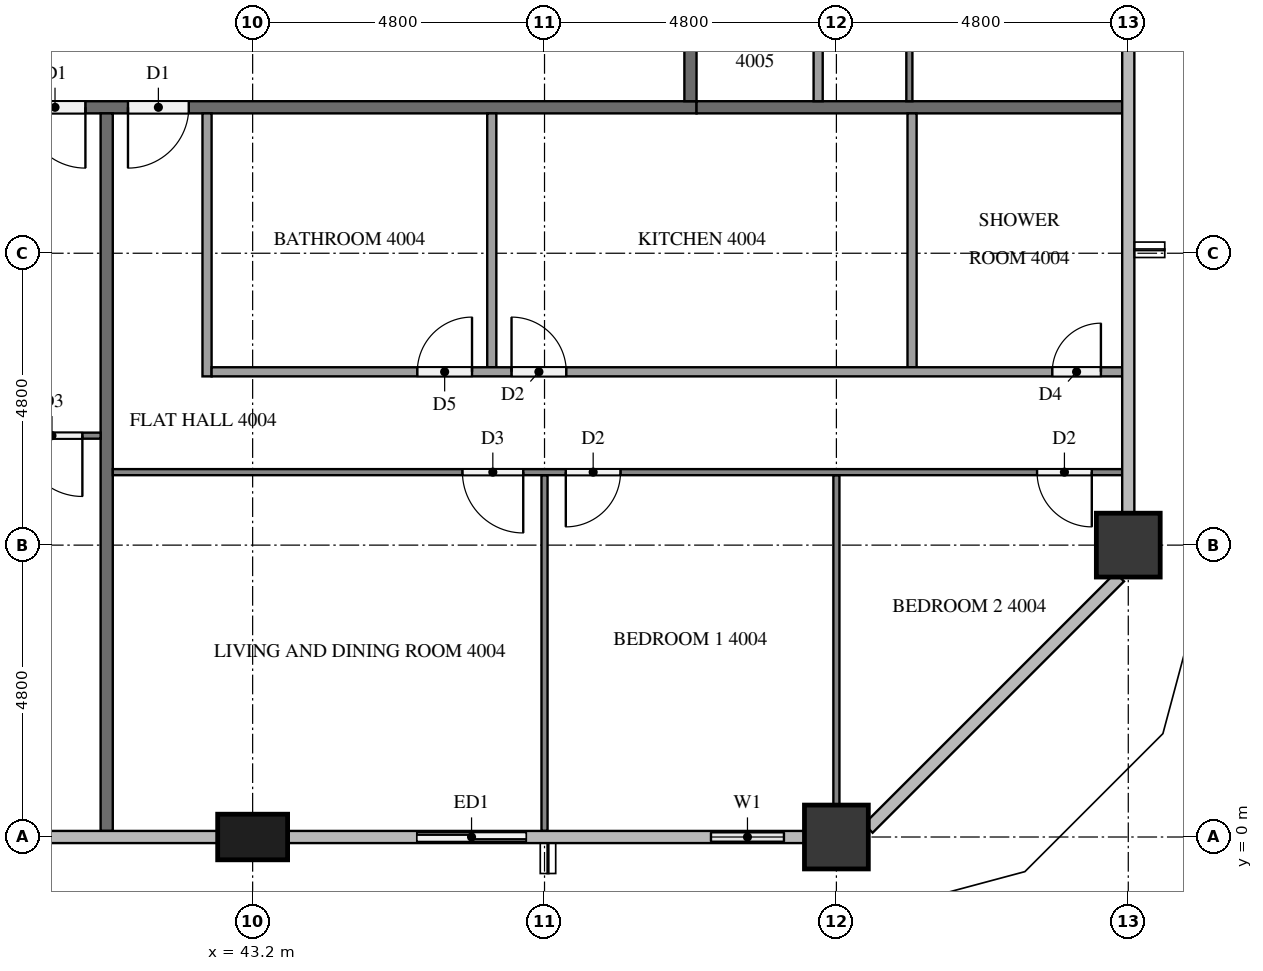
"""IFC4 building model, lengths in metres.
Left out: names, types, materials, properties, quantities, classifications, styles, units other than length and angle.
Written with IfcOpenShell. Run it as: python <this file> out.ifc"""

import sys

from ifc_helpers import new_model, si_unit, direction, frame, frame_2d, origin, origin_2d, place, context, subcontext, project, spatial, rectangle, extrude, element, fill, save


model = new_model("IFC4")
c1 = context("Model", 3, precision=1e-05, world=origin(), true_north=direction((0.0, 1.0)))
c2 = subcontext(c1, "Body", "Model", "MODEL_VIEW")
j1 = project(units=[si_unit("LENGTHUNIT", "METRE"), si_unit("PLANEANGLEUNIT", "RADIAN")], contexts=[c1])
p1 = place(None, origin())
s1 = spatial("IfcSite", under=j1, at=p1, CompositionType="ELEMENT")
p2 = place(p1, origin())
s2 = spatial("IfcBuilding", under=s1, at=p2, CompositionType="ELEMENT")
p3 = place(p2, frame((0.0, 0.0, 156.0)))
s3 = spatial("IfcBuildingStorey", under=s2, at=p3, CompositionType="ELEMENT", Elevation=156.0)
p4 = place(p3, frame((43.2, 0.0, 0.0), z_axis=(0.0, 0.0, 1.0), x_axis=(1.0, 0.0, 0.0)))
e1 = element("IfcColumn", 1, at=p4, inside=s3, PredefinedType="COLUMN", context=c2, shape_type="SweptSolid", body=[
    extrude(rectangle(XDim=1.15, YDim=0.75, at=origin_2d()), origin(), (0.0, 0.0, 1.0), 3.2),
])
for number, where, z_axis, x_axis in (
    (2, (52.8, 0.0, 0.0), (0.0, 0.0, 1.0), (1.0, 0.0, 0.0)),
    (3, (57.6, 4.8, 0.0), (0.0, 0.0, 1.0), (1.0, 0.0, 0.0)),
):
    element("IfcColumn", number, at=place(p3, frame(where, z_axis=z_axis, x_axis=x_axis)), inside=s3, PredefinedType="COLUMN", context=c2, shape_type="SweptSolid", body=[
        extrude(rectangle(XDim=1.05, YDim=1.05, at=origin_2d()), origin(), (0.0, 0.0, 1.0), 3.2),
    ])
p5 = place(p3, frame((45.6, 0.0, 0.0), z_axis=(0.0, 0.0, 1.0), x_axis=(1.0, 0.0, 0.0)))
e4 = element("IfcWall", 4, at=p5, inside=s3, PredefinedType="SOLIDWALL", context=c2, shape_type="SweptSolid", body=[
    extrude(rectangle(XDim=2.4, YDim=0.15, at=frame_2d((1.2, 0.0))), origin(), (0.0, 0.0, 1.0), 3.2),
])
p6 = place(p5, frame((0.3, 0.0, 0.0)))
e5 = element("IfcOpeningElement", 5, at=p6, cuts=e4, PredefinedType="OPENING", context=c2, shape_type="SweptSolid", body=[
    extrude(rectangle(XDim=1.8, YDim=2.4, at=frame_2d((0.9, 1.2))), frame((0.0, 0.085, 0.0), z_axis=(0.0, -1.0, 0.0), x_axis=(1.0, 0.0, 0.0)), (0.0, 0.0, 1.0), 0.17),
])
p7 = place(p3, frame((50.4, 0.0, 0.0), z_axis=(0.0, 0.0, 1.0), x_axis=(1.0, 0.0, 0.0)))
e6 = element("IfcWall", 6, at=p7, inside=s3, PredefinedType="SOLIDWALL", context=c2, shape_type="SweptSolid", body=[
    extrude(rectangle(XDim=1.875, YDim=0.15, at=frame_2d((0.938, 0.0))), origin(), (0.0, 0.0, 1.0), 3.2),
])
p8 = place(p7, frame((0.337, 0.0, 0.9)))
e7 = element("IfcOpeningElement", 7, at=p8, cuts=e6, PredefinedType="OPENING", context=c2, shape_type="SweptSolid", body=[
    extrude(rectangle(XDim=1.2, YDim=1.4, at=frame_2d((0.6, 0.7))), frame((0.0, 0.085, 0.0), z_axis=(0.0, -1.0, 0.0), x_axis=(1.0, 0.0, 0.0)), (0.0, 0.0, 1.0), 0.17),
])
p9 = place(p3, frame((50.5, 12.0, 0.0), z_axis=(0.0, 0.0, 1.0), x_axis=(-1.0, 0.0, 0.0)))
e8 = element("IfcWall", 8, at=p9, inside=s3, PredefinedType="PARTITIONING", context=c2, shape_type="SweptSolid", body=[
    extrude(rectangle(XDim=38.6, YDim=0.2, at=frame_2d((19.3, 0.0))), origin(), (0.0, 0.0, 1.0), 3.2),
])
p10 = place(p9, frame((36.45, 0.0, 0.0)))
e9 = element("IfcOpeningElement", 9, at=p10, cuts=e8, PredefinedType="OPENING", context=c2, shape_type="SweptSolid", body=[
    extrude(rectangle(XDim=1.0, YDim=2.1, at=frame_2d((0.5, 1.05))), frame((0.0, 0.11, 0.0), z_axis=(0.0, -1.0, 0.0), x_axis=(1.0, 0.0, 0.0)), (0.0, 0.0, 1.0), 0.22),
])
p11 = place(p9, frame((34.75, 0.0, 0.0)))
e10 = element("IfcOpeningElement", 10, at=p11, cuts=e8, PredefinedType="OPENING", context=c2, shape_type="SweptSolid", body=[
    extrude(rectangle(XDim=1.0, YDim=2.1, at=frame_2d((0.5, 1.05))), frame((0.0, 0.11, 0.0), z_axis=(0.0, -1.0, 0.0), x_axis=(1.0, 0.0, 0.0)), (0.0, 0.0, 1.0), 0.22),
])
p12 = place(p9, frame((10.05, 0.0, 0.0)))
e11 = element("IfcOpeningElement", 11, at=p12, cuts=e8, PredefinedType="OPENING", context=c2, shape_type="SweptSolid", body=[
    extrude(rectangle(XDim=1.0, YDim=2.1, at=frame_2d((0.5, 1.05))), frame((0.0, 0.11, 0.0), z_axis=(0.0, -1.0, 0.0), x_axis=(1.0, 0.0, 0.0)), (0.0, 0.0, 1.0), 0.22),
])
p13 = place(p9, frame((8.35, 0.0, 0.0)))
e12 = element("IfcOpeningElement", 12, at=p13, cuts=e8, PredefinedType="OPENING", context=c2, shape_type="SweptSolid", body=[
    extrude(rectangle(XDim=1.0, YDim=2.1, at=frame_2d((0.5, 1.05))), frame((0.0, 0.11, 0.0), z_axis=(0.0, -1.0, 0.0), x_axis=(1.0, 0.0, 0.0)), (0.0, 0.0, 1.0), 0.22),
])
p14 = place(p3, frame((50.4, 40.7, 0.0), z_axis=(0.0, 0.0, 1.0), x_axis=(0.0, -1.0, 0.0)))
e13 = element("IfcWall", 13, at=p14, inside=s3, PredefinedType="PARTITIONING", context=c2, shape_type="SweptSolid", body=[
    extrude(rectangle(XDim=28.6, YDim=0.2, at=frame_2d((14.3, 0.0))), origin(), (0.0, 0.0, 1.0), 3.2),
])
p15 = place(p14, frame((17.05, 0.0, 0.0)))
e14 = element("IfcOpeningElement", 14, at=p15, cuts=e13, PredefinedType="OPENING", context=c2, shape_type="SweptSolid", body=[
    extrude(rectangle(XDim=1.0, YDim=2.1, at=frame_2d((0.5, 1.05))), frame((0.0, 0.11, 0.0), z_axis=(0.0, -1.0, 0.0), x_axis=(1.0, 0.0, 0.0)), (0.0, 0.0, 1.0), 0.22),
])
p16 = place(p14, frame((15.35, 0.0, 0.0)))
e15 = element("IfcOpeningElement", 15, at=p16, cuts=e13, PredefinedType="OPENING", context=c2, shape_type="SweptSolid", body=[
    extrude(rectangle(XDim=1.0, YDim=2.1, at=frame_2d((0.5, 1.05))), frame((0.0, 0.11, 0.0), z_axis=(0.0, -1.0, 0.0), x_axis=(1.0, 0.0, 0.0)), (0.0, 0.0, 1.0), 0.22),
])
p17 = place(p14, frame((5.75, 0.0, 0.0)))
e16 = element("IfcOpeningElement", 16, at=p17, cuts=e13, PredefinedType="OPENING", context=c2, shape_type="SweptSolid", body=[
    extrude(rectangle(XDim=1.0, YDim=2.1, at=frame_2d((0.5, 1.05))), frame((0.0, 0.11, 0.0), z_axis=(0.0, -1.0, 0.0), x_axis=(1.0, 0.0, 0.0)), (0.0, 0.0, 1.0), 0.22),
])
p18 = place(p3, frame((40.8, 11.9, 0.0), z_axis=(0.0, 0.0, 1.0), x_axis=(0.0, -1.0, 0.0)))
e17 = element("IfcWall", 17, at=p18, inside=s3, PredefinedType="PARTITIONING", context=c2, shape_type="SweptSolid", body=[
    extrude(rectangle(XDim=11.8, YDim=0.2, at=frame_2d((5.9, 0.0))), origin(), (0.0, 0.0, 1.0), 3.2),
])
p19 = place(p3, frame((50.5, 12.0, 0.0), z_axis=(0.0, 0.0, 1.0), x_axis=(1.0, 0.0, 0.0)))
e18 = element("IfcWall", 18, at=p19, inside=s3, PredefinedType="PARTITIONING", context=c2, shape_type="SweptSolid", body=[
    extrude(rectangle(XDim=7.0, YDim=0.2, at=frame_2d((3.5, 0.0))), origin(), (0.0, 0.0, 1.0), 3.2),
])
p20 = place(p3, frame((40.7, 6.6, 0.0), z_axis=(0.0, 0.0, 1.0), x_axis=(-1.0, 0.0, 0.0)))
e19 = element("IfcWall", 19, at=p20, inside=s3, PredefinedType="PARTITIONING", context=c2, shape_type="SweptSolid", body=[
    extrude(rectangle(XDim=14.2, YDim=0.1, at=frame_2d((7.1, 0.0))), origin(), (0.0, 0.0, 1.0), 3.2),
])
p21 = place(p20, frame((0.3, 0.0, 0.0)))
e20 = element("IfcOpeningElement", 20, at=p21, cuts=e19, PredefinedType="OPENING", context=c2, shape_type="SweptSolid", body=[
    extrude(rectangle(XDim=1.0, YDim=2.1, at=frame_2d((0.5, 1.05))), frame((0.0, 0.06, 0.0), z_axis=(0.0, -1.0, 0.0), x_axis=(1.0, 0.0, 0.0)), (0.0, 0.0, 1.0), 0.12),
])
p22 = place(p20, frame((8.25, 0.0, 0.0)))
e21 = element("IfcOpeningElement", 21, at=p22, cuts=e19, PredefinedType="OPENING", context=c2, shape_type="SweptSolid", body=[
    extrude(rectangle(XDim=0.9, YDim=2.1, at=frame_2d((0.45, 1.05))), frame((0.0, 0.06, 0.0), z_axis=(0.0, -1.0, 0.0), x_axis=(1.0, 0.0, 0.0)), (0.0, 0.0, 1.0), 0.12),
])
p23 = place(p20, frame((9.85, 0.0, 0.0)))
e22 = element("IfcOpeningElement", 22, at=p23, cuts=e19, PredefinedType="OPENING", context=c2, shape_type="SweptSolid", body=[
    extrude(rectangle(XDim=0.9, YDim=2.1, at=frame_2d((0.45, 1.05))), frame((0.0, 0.06, 0.0), z_axis=(0.0, -1.0, 0.0), x_axis=(1.0, 0.0, 0.0)), (0.0, 0.0, 1.0), 0.12),
])
p24 = place(p3, frame((48.0, 5.95, 0.0), z_axis=(0.0, 0.0, 1.0), x_axis=(0.0, -1.0, 0.0)))
e23 = element("IfcWall", 23, at=p24, inside=s3, PredefinedType="PARTITIONING", context=c2, shape_type="SweptSolid", body=[
    extrude(rectangle(XDim=5.85, YDim=0.1, at=frame_2d((2.925, 0.0))), origin(), (0.0, 0.0, 1.0), 3.2),
])
p25 = place(p3, frame((52.8, 5.95, 0.0), z_axis=(0.0, 0.0, 1.0), x_axis=(0.0, -1.0, 0.0)))
e24 = element("IfcWall", 24, at=p25, inside=s3, PredefinedType="PARTITIONING", context=c2, shape_type="SweptSolid", body=[
    extrude(rectangle(XDim=5.425, YDim=0.1, at=frame_2d((2.712, 0.0))), origin(), (0.0, 0.0, 1.0), 3.2),
])
p26 = place(p3, frame((57.5, 6.0, 0.0), z_axis=(0.0, 0.0, 1.0), x_axis=(-1.0, 0.0, 0.0)))
e25 = element("IfcWall", 25, at=p26, inside=s3, PredefinedType="PARTITIONING", context=c2, shape_type="SweptSolid", body=[
    extrude(rectangle(XDim=16.6, YDim=0.1, at=frame_2d((8.3, 0.0))), origin(), (0.0, 0.0, 1.0), 3.2),
])
p27 = place(p26, frame((9.85, 0.0, 0.0)))
e26 = element("IfcOpeningElement", 26, at=p27, cuts=e25, PredefinedType="OPENING", context=c2, shape_type="SweptSolid", body=[
    extrude(rectangle(XDim=1.0, YDim=2.1, at=frame_2d((0.5, 1.05))), frame((0.0, 0.06, 0.0), z_axis=(0.0, -1.0, 0.0), x_axis=(1.0, 0.0, 0.0)), (0.0, 0.0, 1.0), 0.12),
])
p28 = place(p26, frame((8.25, 0.0, 0.0)))
e27 = element("IfcOpeningElement", 27, at=p28, cuts=e25, PredefinedType="OPENING", context=c2, shape_type="SweptSolid", body=[
    extrude(rectangle(XDim=0.9, YDim=2.1, at=frame_2d((0.45, 1.05))), frame((0.0, 0.06, 0.0), z_axis=(0.0, -1.0, 0.0), x_axis=(1.0, 0.0, 0.0)), (0.0, 0.0, 1.0), 0.12),
])
p29 = place(p26, frame((0.5, 0.0, 0.0)))
e28 = element("IfcOpeningElement", 28, at=p29, cuts=e25, PredefinedType="OPENING", context=c2, shape_type="SweptSolid", body=[
    extrude(rectangle(XDim=0.9, YDim=2.1, at=frame_2d((0.45, 1.05))), frame((0.0, 0.06, 0.0), z_axis=(0.0, -1.0, 0.0), x_axis=(1.0, 0.0, 0.0)), (0.0, 0.0, 1.0), 0.12),
])
for number, where, z_axis, x_axis in (
    (29, (47.133, 11.9, 0.0), (0.0, 0.0, 1.0), (0.0, -1.0, 0.0)),
    (30, (54.044, 11.9, 0.0), (0.0, 0.0, 1.0), (0.0, -1.0, 0.0)),
):
    element("IfcWall", number, at=place(p3, frame(where, z_axis=z_axis, x_axis=x_axis)), inside=s3, PredefinedType="PARTITIONING", context=c2, shape_type="SweptSolid", body=[
        extrude(rectangle(XDim=4.175, YDim=0.15, at=frame_2d((2.087, 0.0))), origin(), (0.0, 0.0, 1.0), 3.2),
    ])
p30 = place(p3, frame((42.45, 11.9, 0.0), z_axis=(0.0, 0.0, 1.0), x_axis=(0.0, -1.0, 0.0)))
e31 = element("IfcWall", 31, at=p30, inside=s3, PredefinedType="PARTITIONING", context=c2, shape_type="SweptSolid", body=[
    extrude(rectangle(XDim=4.325, YDim=0.15, at=frame_2d((2.163, 0.0))), origin(), (0.0, 0.0, 1.0), 3.2),
])
p31 = place(p3, frame((42.525, 7.65, 0.0), z_axis=(0.0, 0.0, 1.0), x_axis=(1.0, 0.0, 0.0)))
e32 = element("IfcWall", 32, at=p31, inside=s3, PredefinedType="PARTITIONING", context=c2, shape_type="SweptSolid", body=[
    extrude(rectangle(XDim=14.975, YDim=0.15, at=frame_2d((7.488, 0.0))), origin(), (0.0, 0.0, 1.0), 3.2),
])
p32 = place(p31, frame((3.383, 0.0, 0.0)))
e33 = element("IfcOpeningElement", 33, at=p32, cuts=e32, PredefinedType="OPENING", context=c2, shape_type="SweptSolid", body=[
    extrude(rectangle(XDim=0.9, YDim=2.1, at=frame_2d((0.45, 1.05))), frame((0.0, 0.085, 0.0), z_axis=(0.0, -1.0, 0.0), x_axis=(1.0, 0.0, 0.0)), (0.0, 0.0, 1.0), 0.17),
])
p33 = place(p31, frame((4.933, 0.0, 0.0)))
e34 = element("IfcOpeningElement", 34, at=p33, cuts=e32, PredefinedType="OPENING", context=c2, shape_type="SweptSolid", body=[
    extrude(rectangle(XDim=0.9, YDim=2.1, at=frame_2d((0.45, 1.05))), frame((0.0, 0.085, 0.0), z_axis=(0.0, -1.0, 0.0), x_axis=(1.0, 0.0, 0.0)), (0.0, 0.0, 1.0), 0.17),
])
p34 = place(p31, frame((13.825, 0.0, 0.0)))
e35 = element("IfcOpeningElement", 35, at=p34, cuts=e32, PredefinedType="OPENING", context=c2, shape_type="SweptSolid", body=[
    extrude(rectangle(XDim=0.8, YDim=2.1, at=frame_2d((0.4, 1.05))), frame((0.0, 0.085, 0.0), z_axis=(0.0, -1.0, 0.0), x_axis=(1.0, 0.0, 0.0)), (0.0, 0.0, 1.0), 0.17),
])
p35 = place(p3, frame((54.0, 23.9, 0.0), z_axis=(0.0, 0.0, 1.0), x_axis=(0.0, -1.0, 0.0)))
e36 = element("IfcWall", 36, at=p35, inside=s3, PredefinedType="PARTITIONING", context=c2, shape_type="SweptSolid", body=[
    extrude(rectangle(XDim=11.8, YDim=0.1, at=frame_2d((5.9, 0.0))), origin(), (0.0, 0.0, 1.0), 3.2),
])
p36 = place(p35, frame((3.45, 0.0, 0.0)))
e37 = element("IfcOpeningElement", 37, at=p36, cuts=e36, PredefinedType="OPENING", context=c2, shape_type="SweptSolid", body=[
    extrude(rectangle(XDim=0.9, YDim=2.1, at=frame_2d((0.45, 1.05))), frame((0.0, 0.06, 0.0), z_axis=(0.0, -1.0, 0.0), x_axis=(1.0, 0.0, 0.0)), (0.0, 0.0, 1.0), 0.12),
])
p37 = place(p35, frame((5.05, 0.0, 0.0)))
e38 = element("IfcOpeningElement", 38, at=p37, cuts=e36, PredefinedType="OPENING", context=c2, shape_type="SweptSolid", body=[
    extrude(rectangle(XDim=1.0, YDim=2.1, at=frame_2d((0.5, 1.05))), frame((0.0, 0.06, 0.0), z_axis=(0.0, -1.0, 0.0), x_axis=(1.0, 0.0, 0.0)), (0.0, 0.0, 1.0), 0.12),
])
p38 = place(p3, frame((52.5, 12.1, 0.0), z_axis=(0.0, 0.0, 1.0), x_axis=(0.0, 1.0, 0.0)))
e39 = element("IfcWall", 39, at=p38, inside=s3, PredefinedType="PARTITIONING", context=c2, shape_type="SweptSolid", body=[
    extrude(rectangle(XDim=10.175, YDim=0.15, at=frame_2d((5.087, 0.0))), origin(), (0.0, 0.0, 1.0), 3.2),
])
p39 = place(p38, frame((6.43, 0.0, 0.0)))
e40 = element("IfcOpeningElement", 40, at=p39, cuts=e39, PredefinedType="OPENING", context=c2, shape_type="SweptSolid", body=[
    extrude(rectangle(XDim=0.8, YDim=2.1, at=frame_2d((0.4, 1.05))), frame((0.0, 0.085, 0.0), z_axis=(0.0, -1.0, 0.0), x_axis=(1.0, 0.0, 0.0)), (0.0, 0.0, 1.0), 0.17),
])
p40 = place(p38, frame((4.88, 0.0, 0.0)))
e41 = element("IfcOpeningElement", 41, at=p40, cuts=e39, PredefinedType="OPENING", context=c2, shape_type="SweptSolid", body=[
    extrude(rectangle(XDim=0.9, YDim=2.1, at=frame_2d((0.45, 1.05))), frame((0.0, 0.085, 0.0), z_axis=(0.0, -1.0, 0.0), x_axis=(1.0, 0.0, 0.0)), (0.0, 0.0, 1.0), 0.17),
])
p41 = place(p6, origin())
e42 = element("IfcDoor", 42, at=p41, inside=s3, OperationType="SLIDING_TO_RIGHT", PredefinedType="DOOR", context=c2, shape_type="SweptSolid", body=[
    extrude(rectangle(XDim=1.8, YDim=2.4, at=frame_2d((0.9, 1.2))), frame((0.0, 0.025, 0.0), z_axis=(0.0, -1.0, 0.0), x_axis=(1.0, 0.0, 0.0)), (0.0, 0.0, 1.0), 0.05),
])
fill(e5, e42)
p42 = place(p8, origin())
e43 = element("IfcWindow", 43, at=p42, inside=s3, PartitioningType="SINGLE_PANEL", PredefinedType="WINDOW", context=c2, shape_type="SweptSolid", body=[
    extrude(rectangle(XDim=1.2, YDim=1.4, at=frame_2d((0.6, 0.7))), frame((0.0, 0.03, 0.0), z_axis=(0.0, -1.0, 0.0), x_axis=(1.0, 0.0, 0.0)), (0.0, 0.0, 1.0), 0.06),
])
fill(e7, e43)
p43 = place(p12, origin())
e44 = element("IfcDoor", 44, at=p43, inside=s3, OperationType="SINGLE_SWING_LEFT", PredefinedType="DOOR", context=c2, shape_type="SweptSolid", body=[
    extrude(rectangle(XDim=1.0, YDim=2.1, at=frame_2d((0.5, 1.05))), frame((0.0, 0.025, 0.0), z_axis=(0.0, -1.0, 0.0), x_axis=(1.0, 0.0, 0.0)), (0.0, 0.0, 1.0), 0.05),
])
fill(e11, e44)
p44 = place(p13, origin())
e45 = element("IfcDoor", 45, at=p44, inside=s3, OperationType="SINGLE_SWING_RIGHT", PredefinedType="DOOR", context=c2, shape_type="SweptSolid", body=[
    extrude(rectangle(XDim=1.0, YDim=2.1, at=frame_2d((0.5, 1.05))), frame((0.0, 0.025, 0.0), z_axis=(0.0, -1.0, 0.0), x_axis=(1.0, 0.0, 0.0)), (0.0, 0.0, 1.0), 0.05),
])
fill(e12, e45)
p45 = place(p21, origin())
e46 = element("IfcDoor", 46, at=p45, inside=s3, OperationType="SINGLE_SWING_LEFT", PredefinedType="DOOR", context=c2, shape_type="SweptSolid", body=[
    extrude(rectangle(XDim=1.0, YDim=2.1, at=frame_2d((0.5, 1.05))), frame((0.0, 0.025, 0.0), z_axis=(0.0, -1.0, 0.0), x_axis=(1.0, 0.0, 0.0)), (0.0, 0.0, 1.0), 0.05),
])
fill(e20, e46)
p46 = place(p27, origin())
e47 = element("IfcDoor", 47, at=p46, inside=s3, OperationType="SINGLE_SWING_LEFT", PredefinedType="DOOR", context=c2, shape_type="SweptSolid", body=[
    extrude(rectangle(XDim=1.0, YDim=2.1, at=frame_2d((0.5, 1.05))), frame((0.0, 0.025, 0.0), z_axis=(0.0, -1.0, 0.0), x_axis=(1.0, 0.0, 0.0)), (0.0, 0.0, 1.0), 0.05),
])
fill(e26, e47)
p47 = place(p28, origin())
e48 = element("IfcDoor", 48, at=p47, inside=s3, OperationType="SINGLE_SWING_RIGHT", PredefinedType="DOOR", context=c2, shape_type="SweptSolid", body=[
    extrude(rectangle(XDim=0.9, YDim=2.1, at=frame_2d((0.45, 1.05))), frame((0.0, 0.025, 0.0), z_axis=(0.0, -1.0, 0.0), x_axis=(1.0, 0.0, 0.0)), (0.0, 0.0, 1.0), 0.05),
])
fill(e27, e48)
p48 = place(p29, origin())
e49 = element("IfcDoor", 49, at=p48, inside=s3, OperationType="SINGLE_SWING_LEFT", PredefinedType="DOOR", context=c2, shape_type="SweptSolid", body=[
    extrude(rectangle(XDim=0.9, YDim=2.1, at=frame_2d((0.45, 1.05))), frame((0.0, 0.025, 0.0), z_axis=(0.0, -1.0, 0.0), x_axis=(1.0, 0.0, 0.0)), (0.0, 0.0, 1.0), 0.05),
])
fill(e28, e49)
p49 = place(p32, origin())
e50 = element("IfcDoor", 50, at=p49, inside=s3, OperationType="SINGLE_SWING_RIGHT", PredefinedType="DOOR", context=c2, shape_type="SweptSolid", body=[
    extrude(rectangle(XDim=0.9, YDim=2.1, at=frame_2d((0.45, 1.05))), frame((0.0, 0.025, 0.0), z_axis=(0.0, -1.0, 0.0), x_axis=(1.0, 0.0, 0.0)), (0.0, 0.0, 1.0), 0.05),
])
fill(e33, e50)
p50 = place(p33, origin())
e51 = element("IfcDoor", 51, at=p50, inside=s3, OperationType="SINGLE_SWING_LEFT", PredefinedType="DOOR", context=c2, shape_type="SweptSolid", body=[
    extrude(rectangle(XDim=0.9, YDim=2.1, at=frame_2d((0.45, 1.05))), frame((0.0, 0.025, 0.0), z_axis=(0.0, -1.0, 0.0), x_axis=(1.0, 0.0, 0.0)), (0.0, 0.0, 1.0), 0.05),
])
fill(e34, e51)
p51 = place(p34, origin())
e52 = element("IfcDoor", 52, at=p51, inside=s3, OperationType="SINGLE_SWING_RIGHT", PredefinedType="DOOR", context=c2, shape_type="SweptSolid", body=[
    extrude(rectangle(XDim=0.8, YDim=2.1, at=frame_2d((0.4, 1.05))), frame((0.0, 0.025, 0.0), z_axis=(0.0, -1.0, 0.0), x_axis=(1.0, 0.0, 0.0)), (0.0, 0.0, 1.0), 0.05),
])
fill(e35, e52)
save(model, sys.argv[1])
